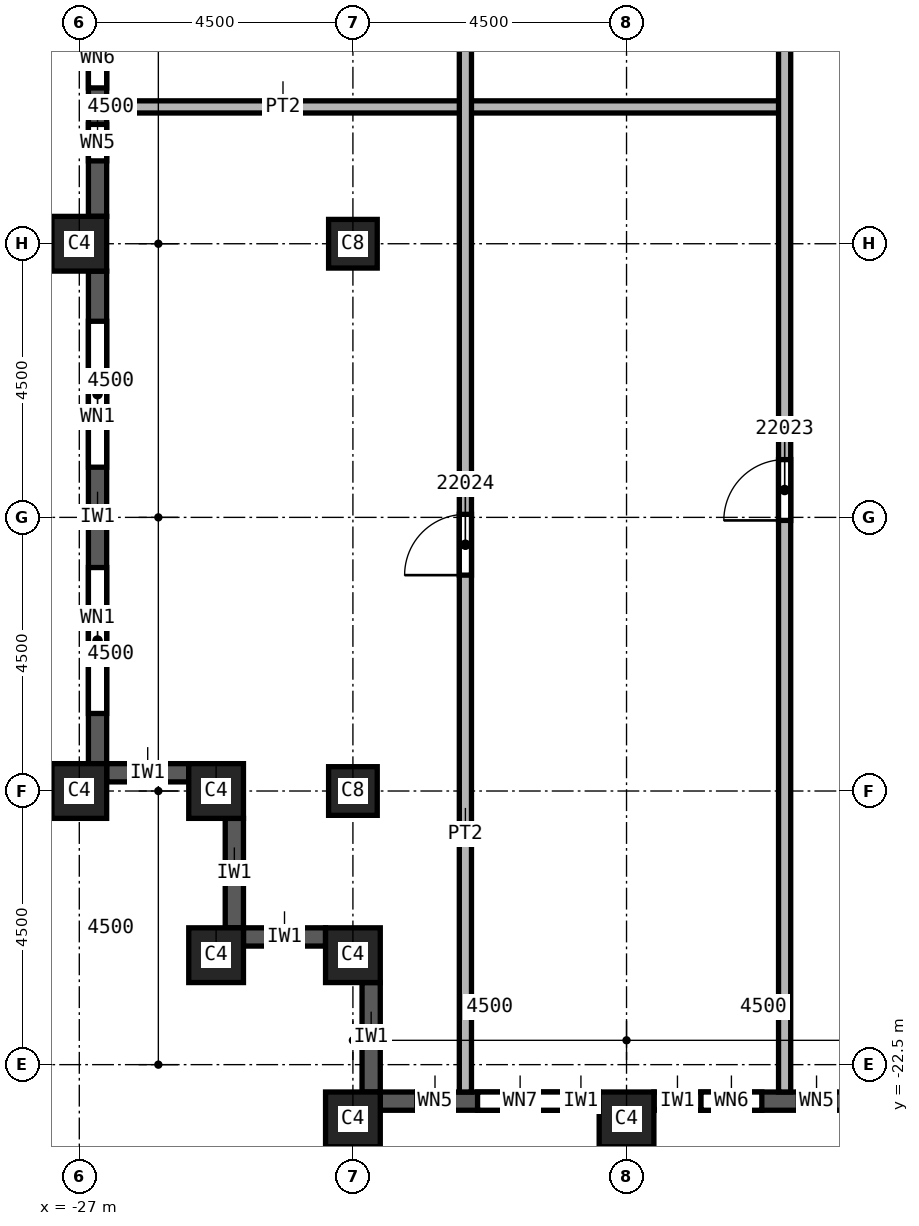
"""IFC4 building model, lengths in metres.
Left out: names, types, materials, properties, quantities, classifications, styles, units other than length and angle.
Written with IfcOpenShell. Run it as: python <this file> out.ifc"""

import sys

from ifc_helpers import new_model, si_unit, direction, frame, frame_2d, origin, origin_2d, place, context, subcontext, project, spatial, rectangle, extrude, element, fill, save


model = new_model("IFC4")
c1 = context("Model", 3, precision=1e-05, world=origin(), true_north=direction((0.0, 1.0)))
c2 = subcontext(c1, "Body", "Model", "MODEL_VIEW")
j1 = project(units=[si_unit("LENGTHUNIT", "METRE"), si_unit("PLANEANGLEUNIT", "RADIAN")], contexts=[c1])
p1 = place(None, origin())
s1 = spatial("IfcSite", under=j1, at=p1, CompositionType="ELEMENT")
p2 = place(p1, origin())
s2 = spatial("IfcBuilding", under=s1, at=p2, CompositionType="ELEMENT")
p3 = place(p2, frame((0.0, 0.0, 312.0)))
s3 = spatial("IfcBuildingStorey", under=s2, at=p3, CompositionType="ELEMENT", Elevation=312.0)
for number, where, z_axis, x_axis in (
    (1, (-22.5, -9.0, 0.0), (0.0, 0.0, 1.0), (1.0, 0.0, 0.0)),
    (2, (-22.5, -18.0, 0.0), (0.0, 0.0, 1.0), (1.0, 0.0, 0.0)),
):
    element("IfcColumn", number, at=place(p3, frame(where, z_axis=z_axis, x_axis=x_axis)), inside=s3, PredefinedType="COLUMN", context=c2, shape_type="SweptSolid", body=[
        extrude(rectangle(XDim=0.8, YDim=0.8, at=origin_2d()), origin(), (0.0, 0.0, 1.0), 3.74),
    ])
for number, where, z_axis, x_axis in (
    (3, (-18.0, -23.4, 0.0), (0.0, 0.0, 1.0), (1.0, 0.0, 0.0)),
    (4, (-22.5, -23.4, 0.0), (0.0, 0.0, 1.0), (1.0, 0.0, 0.0)),
    (5, (-27.0, -9.0, 0.0), (0.0, 0.0, 1.0), (0.0, 1.0, 0.0)),
    (6, (-27.0, -18.0, 0.0), (0.0, 0.0, 1.0), (0.0, 1.0, 0.0)),
    (7, (-22.5, -20.7, 0.0), (0.0, 0.0, 1.0), (1.0, 0.0, 0.0)),
    (8, (-24.75, -20.7, 0.0), (0.0, 0.0, 1.0), (1.0, 0.0, 0.0)),
    (9, (-24.75, -18.0, 0.0), (0.0, 0.0, 1.0), (1.0, 0.0, 0.0)),
):
    element("IfcColumn", number, at=place(p3, frame(where, z_axis=z_axis, x_axis=x_axis)), inside=s3, PredefinedType="COLUMN", context=c2, shape_type="SweptSolid", body=[
        extrude(rectangle(XDim=0.9, YDim=0.9, at=origin_2d()), origin(), (0.0, 0.0, 1.0), 3.74),
    ])
p4 = place(p3, frame((-26.7, -0.45, 0.0), z_axis=(0.0, 0.0, 1.0), x_axis=(0.0, -1.0, 0.0)))
e10 = element("IfcWall", 10, at=p4, inside=s3, PredefinedType="SOLIDWALL", context=c2, shape_type="SweptSolid", body=[
    extrude(rectangle(XDim=8.1, YDim=0.3, at=frame_2d((4.05, 0.0))), origin(), (0.0, 0.0, 1.0), 3.14),
])
p5 = place(p4, frame((0.825, 0.0, 0.8)))
e11 = element("IfcOpeningElement", 11, at=p5, cuts=e10, PredefinedType="OPENING", context=c2, shape_type="SweptSolid", body=[
    extrude(rectangle(XDim=2.4, YDim=1.95, at=frame_2d((1.2, 0.975))), frame((0.0, 0.15, 0.0), z_axis=(0.0, -1.0, 0.0), x_axis=(1.0, 0.0, 0.0)), (0.0, 0.0, 1.0), 0.3),
])
p6 = place(p4, frame((4.988, 0.0, 0.8)))
e12 = element("IfcOpeningElement", 12, at=p6, cuts=e10, PredefinedType="OPENING", context=c2, shape_type="SweptSolid", body=[
    extrude(rectangle(XDim=1.0, YDim=1.95, at=frame_2d((0.5, 0.975))), frame((0.0, 0.15, 0.0), z_axis=(0.0, -1.0, 0.0), x_axis=(1.0, 0.0, 0.0)), (0.0, 0.0, 1.0), 0.3),
])
p7 = place(p4, frame((6.587, 0.0, 0.8)))
e13 = element("IfcOpeningElement", 13, at=p7, cuts=e10, PredefinedType="OPENING", context=c2, shape_type="SweptSolid", body=[
    extrude(rectangle(XDim=0.6, YDim=1.95, at=frame_2d((0.3, 0.975))), frame((0.0, 0.15, 0.0), z_axis=(0.0, -1.0, 0.0), x_axis=(1.0, 0.0, 0.0)), (0.0, 0.0, 1.0), 0.3),
])
p8 = place(p3, frame((-26.7, -9.45, 0.0), z_axis=(0.0, 0.0, 1.0), x_axis=(0.0, -1.0, 0.0)))
e14 = element("IfcWall", 14, at=p8, inside=s3, PredefinedType="SOLIDWALL", context=c2, shape_type="SweptSolid", body=[
    extrude(rectangle(XDim=8.1, YDim=0.3, at=frame_2d((4.05, 0.0))), origin(), (0.0, 0.0, 1.0), 3.14),
])
p9 = place(p8, frame((0.825, 0.0, 0.8)))
e15 = element("IfcOpeningElement", 15, at=p9, cuts=e14, PredefinedType="OPENING", context=c2, shape_type="SweptSolid", body=[
    extrude(rectangle(XDim=2.4, YDim=1.95, at=frame_2d((1.2, 0.975))), frame((0.0, 0.15, 0.0), z_axis=(0.0, -1.0, 0.0), x_axis=(1.0, 0.0, 0.0)), (0.0, 0.0, 1.0), 0.3),
])
p10 = place(p8, frame((4.875, 0.0, 0.8)))
e16 = element("IfcOpeningElement", 16, at=p10, cuts=e14, PredefinedType="OPENING", context=c2, shape_type="SweptSolid", body=[
    extrude(rectangle(XDim=2.4, YDim=1.95, at=frame_2d((1.2, 0.975))), frame((0.0, 0.15, 0.0), z_axis=(0.0, -1.0, 0.0), x_axis=(1.0, 0.0, 0.0)), (0.0, 0.0, 1.0), 0.3),
])
p11 = place(p3, frame((-26.55, -17.7, 0.0), z_axis=(0.0, 0.0, 1.0), x_axis=(1.0, 0.0, 0.0)))
e17 = element("IfcWall", 17, at=p11, inside=s3, PredefinedType="SOLIDWALL", context=c2, shape_type="SweptSolid", body=[
    extrude(rectangle(XDim=1.35, YDim=0.3, at=frame_2d((0.675, 0.0))), origin(), (0.0, 0.0, 1.0), 3.14),
])
p12 = place(p3, frame((-24.45, -18.45, 0.0), z_axis=(0.0, 0.0, 1.0), x_axis=(0.0, -1.0, 0.0)))
e18 = element("IfcWall", 18, at=p12, inside=s3, PredefinedType="SOLIDWALL", context=c2, shape_type="SweptSolid", body=[
    extrude(rectangle(XDim=1.8, YDim=0.3, at=frame_2d((0.9, 0.0))), origin(), (0.0, 0.0, 1.0), 3.14),
])
p13 = place(p3, frame((-24.3, -20.4, 0.0), z_axis=(0.0, 0.0, 1.0), x_axis=(1.0, 0.0, 0.0)))
e19 = element("IfcWall", 19, at=p13, inside=s3, PredefinedType="SOLIDWALL", context=c2, shape_type="SweptSolid", body=[
    extrude(rectangle(XDim=1.35, YDim=0.3, at=frame_2d((0.675, 0.0))), origin(), (0.0, 0.0, 1.0), 3.14),
])
p14 = place(p3, frame((-22.2, -21.15, 0.0), z_axis=(0.0, 0.0, 1.0), x_axis=(0.0, -1.0, 0.0)))
e20 = element("IfcWall", 20, at=p14, inside=s3, PredefinedType="SOLIDWALL", context=c2, shape_type="SweptSolid", body=[
    extrude(rectangle(XDim=1.8, YDim=0.3, at=frame_2d((0.9, 0.0))), origin(), (0.0, 0.0, 1.0), 3.14),
])
p15 = place(p3, frame((-22.05, -23.1, 0.0), z_axis=(0.0, 0.0, 1.0), x_axis=(1.0, 0.0, 0.0)))
e21 = element("IfcWall", 21, at=p15, inside=s3, PredefinedType="SOLIDWALL", context=c2, shape_type="SweptSolid", body=[
    extrude(rectangle(XDim=3.6, YDim=0.3, at=frame_2d((1.8, 0.0))), origin(), (0.0, 0.0, 1.0), 3.14),
])
p16 = place(p15, frame((0.6, 0.0, 0.8)))
e22 = element("IfcOpeningElement", 22, at=p16, cuts=e21, PredefinedType="OPENING", context=c2, shape_type="SweptSolid", body=[
    extrude(rectangle(XDim=0.6, YDim=1.95, at=frame_2d((0.3, 0.975))), frame((0.0, 0.15, 0.0), z_axis=(0.0, -1.0, 0.0), x_axis=(1.0, 0.0, 0.0)), (0.0, 0.0, 1.0), 0.3),
])
p17 = place(p15, frame((1.6, 0.0, 0.8)))
e23 = element("IfcOpeningElement", 23, at=p17, cuts=e21, PredefinedType="OPENING", context=c2, shape_type="SweptSolid", body=[
    extrude(rectangle(XDim=1.4, YDim=1.95, at=frame_2d((0.7, 0.975))), frame((0.0, 0.15, 0.0), z_axis=(0.0, -1.0, 0.0), x_axis=(1.0, 0.0, 0.0)), (0.0, 0.0, 1.0), 0.3),
])
p18 = place(p3, frame((-17.55, -23.1, 0.0), z_axis=(0.0, 0.0, 1.0), x_axis=(1.0, 0.0, 0.0)))
e24 = element("IfcWall", 24, at=p18, inside=s3, PredefinedType="SOLIDWALL", context=c2, shape_type="SweptSolid", body=[
    extrude(rectangle(XDim=3.6, YDim=0.3, at=frame_2d((1.8, 0.0))), origin(), (0.0, 0.0, 1.0), 3.14),
])
p19 = place(p18, frame((0.775, 0.0, 0.8)))
e25 = element("IfcOpeningElement", 25, at=p19, cuts=e24, PredefinedType="OPENING", context=c2, shape_type="SweptSolid", body=[
    extrude(rectangle(XDim=1.0, YDim=1.95, at=frame_2d((0.5, 0.975))), frame((0.0, 0.15, 0.0), z_axis=(0.0, -1.0, 0.0), x_axis=(1.0, 0.0, 0.0)), (0.0, 0.0, 1.0), 0.3),
])
p20 = place(p18, frame((2.375, 0.0, 0.8)))
e26 = element("IfcOpeningElement", 26, at=p20, cuts=e24, PredefinedType="OPENING", context=c2, shape_type="SweptSolid", body=[
    extrude(rectangle(XDim=0.6, YDim=1.95, at=frame_2d((0.3, 0.975))), frame((0.0, 0.15, 0.0), z_axis=(0.0, -1.0, 0.0), x_axis=(1.0, 0.0, 0.0)), (0.0, 0.0, 1.0), 0.3),
])
p21 = place(p3, frame((-26.55, -6.75, 0.0), z_axis=(0.0, 0.0, 1.0), x_axis=(1.0, 0.0, 0.0)))
e27 = element("IfcWall", 27, at=p21, inside=s3, PredefinedType="PARTITIONING", context=c2, shape_type="SweptSolid", body=[
    extrude(rectangle(XDim=11.15, YDim=0.2, at=frame_2d((5.575, 0.0))), origin(), (0.0, 0.0, 1.0), 3.74),
])
p22 = place(p3, frame((-20.65, -22.95, 0.0), z_axis=(0.0, 0.0, 1.0), x_axis=(0.0, 1.0, 0.0)))
e28 = element("IfcWall", 28, at=p22, inside=s3, PredefinedType="PARTITIONING", context=c2, shape_type="SweptSolid", body=[
    extrude(rectangle(XDim=22.95, YDim=0.2, at=frame_2d((11.475, 0.0))), origin(), (0.0, 0.0, 1.0), 3.74),
])
p23 = place(p22, frame((8.5, 0.0, 0.0)))
e29 = element("IfcOpeningElement", 29, at=p23, cuts=e28, PredefinedType="OPENING", context=c2, shape_type="SweptSolid", body=[
    extrude(rectangle(XDim=1.0, YDim=2.1, at=frame_2d((0.5, 1.05))), frame((0.0, 0.1, 0.0), z_axis=(0.0, -1.0, 0.0), x_axis=(1.0, 0.0, 0.0)), (0.0, 0.0, 1.0), 0.2),
])
p24 = place(p22, frame((18.25, 0.0, 0.0)))
e30 = element("IfcOpeningElement", 30, at=p24, cuts=e28, PredefinedType="OPENING", context=c2, shape_type="SweptSolid", body=[
    extrude(rectangle(XDim=1.0, YDim=2.1, at=frame_2d((0.5, 1.05))), frame((0.0, 0.1, 0.0), z_axis=(0.0, -1.0, 0.0), x_axis=(1.0, 0.0, 0.0)), (0.0, 0.0, 1.0), 0.2),
])
p25 = place(p3, frame((-15.4, -22.95, 0.0), z_axis=(0.0, 0.0, 1.0), x_axis=(0.0, 1.0, 0.0)))
e31 = element("IfcWall", 31, at=p25, inside=s3, PredefinedType="PARTITIONING", context=c2, shape_type="SweptSolid", body=[
    extrude(rectangle(XDim=36.55, YDim=0.2, at=frame_2d((18.275, 0.0))), origin(), (0.0, 0.0, 1.0), 3.74),
])
p26 = place(p25, frame((24.3, 0.0, 0.0)))
e32 = element("IfcOpeningElement", 32, at=p26, cuts=e31, PredefinedType="OPENING", context=c2, shape_type="SweptSolid", body=[
    extrude(rectangle(XDim=1.0, YDim=2.1, at=frame_2d((0.5, 1.05))), frame((0.0, 0.1, 0.0), z_axis=(0.0, -1.0, 0.0), x_axis=(1.0, 0.0, 0.0)), (0.0, 0.0, 1.0), 0.2),
])
p27 = place(p25, frame((9.4, 0.0, 0.0)))
e33 = element("IfcOpeningElement", 33, at=p27, cuts=e31, PredefinedType="OPENING", context=c2, shape_type="SweptSolid", body=[
    extrude(rectangle(XDim=1.0, YDim=2.1, at=frame_2d((0.5, 1.05))), frame((0.0, 0.1, 0.0), z_axis=(0.0, -1.0, 0.0), x_axis=(1.0, 0.0, 0.0)), (0.0, 0.0, 1.0), 0.2),
])
p28 = place(p25, frame((19.05, 0.0, 0.0)))
e34 = element("IfcOpeningElement", 34, at=p28, cuts=e31, PredefinedType="OPENING", context=c2, shape_type="SweptSolid", body=[
    extrude(rectangle(XDim=1.0, YDim=2.1, at=frame_2d((0.5, 1.05))), frame((0.0, 0.1, 0.0), z_axis=(0.0, -1.0, 0.0), x_axis=(1.0, 0.0, 0.0)), (0.0, 0.0, 1.0), 0.2),
])
p29 = place(p9, origin())
e35 = element("IfcWindow", 35, at=p29, inside=s3, PartitioningType="SINGLE_PANEL", PredefinedType="WINDOW", context=c2, shape_type="SweptSolid", body=[
    extrude(rectangle(XDim=2.4, YDim=1.95, at=frame_2d((1.2, 0.975))), frame((0.0, 0.03, 0.0), z_axis=(0.0, -1.0, 0.0), x_axis=(1.0, 0.0, 0.0)), (0.0, 0.0, 1.0), 0.06),
])
fill(e15, e35)
p30 = place(p10, origin())
e36 = element("IfcWindow", 36, at=p30, inside=s3, PartitioningType="SINGLE_PANEL", PredefinedType="WINDOW", context=c2, shape_type="SweptSolid", body=[
    extrude(rectangle(XDim=2.4, YDim=1.95, at=frame_2d((1.2, 0.975))), frame((0.0, 0.03, 0.0), z_axis=(0.0, -1.0, 0.0), x_axis=(1.0, 0.0, 0.0)), (0.0, 0.0, 1.0), 0.06),
])
fill(e16, e36)
p31 = place(p27, origin())
e37 = element("IfcDoor", 37, at=p31, inside=s3, OperationType="SINGLE_SWING_RIGHT", PredefinedType="DOOR", context=c2, shape_type="SweptSolid", body=[
    extrude(rectangle(XDim=1.0, YDim=2.1, at=frame_2d((0.5, 1.05))), frame((0.0, 0.025, 0.0), z_axis=(0.0, -1.0, 0.0), x_axis=(1.0, 0.0, 0.0)), (0.0, 0.0, 1.0), 0.05),
])
fill(e33, e37)
p32 = place(p23, origin())
e38 = element("IfcDoor", 38, at=p32, inside=s3, OperationType="SINGLE_SWING_LEFT", PredefinedType="DOOR", context=c2, shape_type="SweptSolid", body=[
    extrude(rectangle(XDim=1.0, YDim=2.1, at=frame_2d((0.5, 1.05))), frame((0.0, 0.025, 0.0), z_axis=(0.0, -1.0, 0.0), x_axis=(1.0, 0.0, 0.0)), (0.0, 0.0, 1.0), 0.05),
])
fill(e29, e38)
p33 = place(p6, origin())
e39 = element("IfcWindow", 39, at=p33, inside=s3, PartitioningType="SINGLE_PANEL", PredefinedType="WINDOW", context=c2, shape_type="SweptSolid", body=[
    extrude(rectangle(XDim=1.0, YDim=1.95, at=frame_2d((0.5, 0.975))), frame((0.0, 0.03, 0.0), z_axis=(0.0, -1.0, 0.0), x_axis=(1.0, 0.0, 0.0)), (0.0, 0.0, 1.0), 0.06),
])
fill(e12, e39)
p34 = place(p7, origin())
e40 = element("IfcWindow", 40, at=p34, inside=s3, PartitioningType="SINGLE_PANEL", PredefinedType="WINDOW", context=c2, shape_type="SweptSolid", body=[
    extrude(rectangle(XDim=0.6, YDim=1.95, at=frame_2d((0.3, 0.975))), frame((0.0, 0.03, 0.0), z_axis=(0.0, -1.0, 0.0), x_axis=(1.0, 0.0, 0.0)), (0.0, 0.0, 1.0), 0.06),
])
fill(e13, e40)
p35 = place(p16, origin())
e41 = element("IfcWindow", 41, at=p35, inside=s3, PartitioningType="SINGLE_PANEL", PredefinedType="WINDOW", context=c2, shape_type="SweptSolid", body=[
    extrude(rectangle(XDim=0.6, YDim=1.95, at=frame_2d((0.3, 0.975))), frame((0.0, 0.03, 0.0), z_axis=(0.0, -1.0, 0.0), x_axis=(1.0, 0.0, 0.0)), (0.0, 0.0, 1.0), 0.06),
])
fill(e22, e41)
p36 = place(p17, origin())
e42 = element("IfcWindow", 42, at=p36, inside=s3, PartitioningType="SINGLE_PANEL", PredefinedType="WINDOW", context=c2, shape_type="SweptSolid", body=[
    extrude(rectangle(XDim=1.4, YDim=1.95, at=frame_2d((0.7, 0.975))), frame((0.0, 0.03, 0.0), z_axis=(0.0, -1.0, 0.0), x_axis=(1.0, 0.0, 0.0)), (0.0, 0.0, 1.0), 0.06),
])
fill(e23, e42)
p37 = place(p19, origin())
e43 = element("IfcWindow", 43, at=p37, inside=s3, PartitioningType="SINGLE_PANEL", PredefinedType="WINDOW", context=c2, shape_type="SweptSolid", body=[
    extrude(rectangle(XDim=1.0, YDim=1.95, at=frame_2d((0.5, 0.975))), frame((0.0, 0.03, 0.0), z_axis=(0.0, -1.0, 0.0), x_axis=(1.0, 0.0, 0.0)), (0.0, 0.0, 1.0), 0.06),
])
fill(e25, e43)
p38 = place(p20, origin())
e44 = element("IfcWindow", 44, at=p38, inside=s3, PartitioningType="SINGLE_PANEL", PredefinedType="WINDOW", context=c2, shape_type="SweptSolid", body=[
    extrude(rectangle(XDim=0.6, YDim=1.95, at=frame_2d((0.3, 0.975))), frame((0.0, 0.03, 0.0), z_axis=(0.0, -1.0, 0.0), x_axis=(1.0, 0.0, 0.0)), (0.0, 0.0, 1.0), 0.06),
])
fill(e26, e44)
save(model, sys.argv[1])
